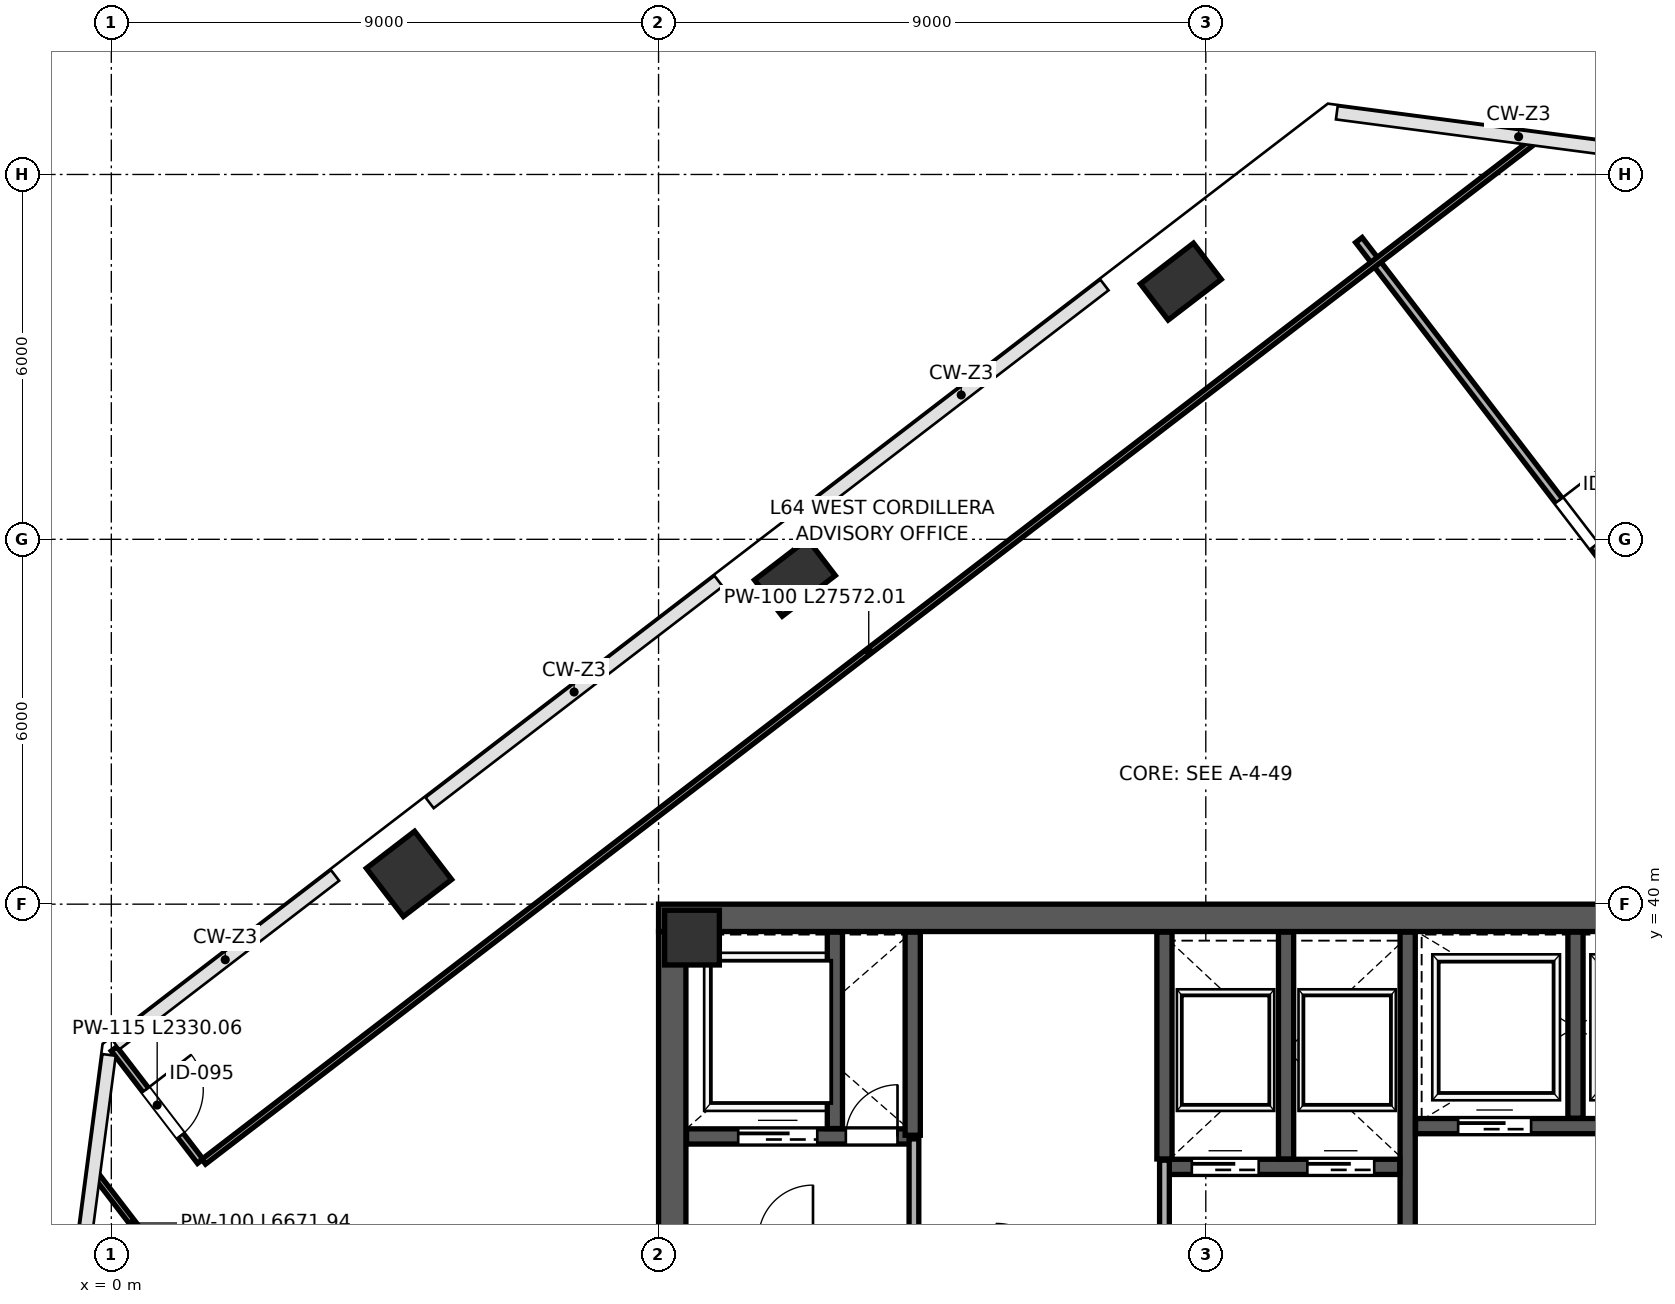
"""IFC4 building model, lengths in metres.
Left out: names, types, materials, properties, quantities, classifications, styles, units other than length and angle.
Written with IfcOpenShell. Run it as: python <this file> out.ifc"""

import sys

from ifc_helpers import new_model, si_unit, direction, frame, frame_2d, origin, origin_2d, place, context, subcontext, project, spatial, rectangle, extrude, source, transform, mapped, element, fill, save


model = new_model("IFC4")
c1 = context("Model", 3, precision=1e-05, world=origin(), true_north=direction((0.0, 1.0)))
c2 = subcontext(c1, "Body", "Model", "MODEL_VIEW")
j1 = project(units=[si_unit("LENGTHUNIT", "METRE"), si_unit("PLANEANGLEUNIT", "RADIAN")], contexts=[c1])
p1 = place(None, origin())
s1 = spatial("IfcSite", under=j1, at=p1, CompositionType="ELEMENT")
p2 = place(p1, origin())
s2 = spatial("IfcBuilding", under=s1, at=p2, CompositionType="ELEMENT")
p3 = place(p2, frame((0.0, 0.0, 283.6)))
s3 = spatial("IfcBuildingStorey", under=s2, at=p3, CompositionType="ELEMENT", Elevation=283.6)
m1 = source(origin(), c2, "Body", "SweptSolid", [
    extrude(rectangle(XDim=0.9, YDim=0.9, at=origin_2d()), origin(), (0.0, 0.0, 1.0), 4.198),
])
p4 = place(p3, frame((9.55, 39.45, 0.001), z_axis=(0.0, 0.0, 1.0), x_axis=(1.0, 0.0, 0.0)))
e1 = element("IfcColumn", 1, at=p4, inside=s3, PredefinedType="COLUMN", context=c2, shape_type="MappedRepresentation", body=[
    mapped(m1, transform((0.0, 0.0, 0.0), scale=1.0)),
])
m2 = source(origin(), c2, "Body", "SweptSolid", [
    extrude(rectangle(XDim=1.0, YDim=1.0, at=origin_2d()), origin(), (0.0, 0.0, 1.0), 4.198),
])
p5 = place(p3, frame((4.896, 40.498, 0.001), z_axis=(0.0, 0.0, 1.0), x_axis=(-0.608761429009, 0.793353340291, 0.0)))
e2 = element("IfcColumn", 2, at=p5, inside=s3, PredefinedType="COLUMN", context=c2, shape_type="MappedRepresentation", body=[
    mapped(m2, transform((0.0, 0.0, 0.0), scale=1.0)),
])
m3 = source(origin(), c2, "Body", "SweptSolid", [
    extrude(rectangle(XDim=0.75, YDim=1.1, at=origin_2d()), origin(), (0.0, 0.0, 1.0), 4.198),
])
for number, where, z_axis, x_axis in (
    (3, (11.242, 45.368, 0.001), (0.0, 0.0, 1.0), (-0.609, 0.793, 0.0)),
    (4, (17.589, 50.238, 0.001), (0.0, 0.0, 1.0), (-0.609, 0.793, 0.0)),
):
    element("IfcColumn", number, at=place(p3, frame(where, z_axis=z_axis, x_axis=x_axis)), inside=s3, PredefinedType="PILASTER", context=c2, shape_type="MappedRepresentation", body=[
        mapped(m3, transform((0.0, 0.0, 0.0), scale=1.0)),
    ])
p6 = place(p3, frame((9.225, 24.45, 0.0), z_axis=(0.0, 0.0, 1.0), x_axis=(0.0, 1.0, 0.0)))
e5 = element("IfcWall", 5, at=p6, inside=s3, PredefinedType="SHEAR", context=c2, shape_type="SweptSolid", body=[
    extrude(rectangle(XDim=15.1, YDim=0.45, at=frame_2d((7.55, 0.0))), origin(), (0.0, 0.0, 1.0), 3.92),
])
p7 = place(p6, frame((8.7, 0.0, 0.0)))
e6 = element("IfcOpeningElement", 6, at=p7, cuts=e5, PredefinedType="OPENING", context=c2, shape_type="SweptSolid", body=[
    extrude(rectangle(XDim=1.15, YDim=2.2, at=frame_2d((0.575, 1.1))), frame((0.0, 0.235, 0.0), z_axis=(0.0, -1.0, 0.0), x_axis=(1.0, 0.0, 0.0)), (0.0, 0.0, 1.0), 0.47),
])
p8 = place(p3, frame((9.0, 39.775, 0.0), z_axis=(0.0, 0.0, 1.0), x_axis=(1.0, 0.0, 0.0)))
e7 = element("IfcWall", 7, at=p8, inside=s3, PredefinedType="SHEAR", context=c2, shape_type="SweptSolid", body=[
    extrude(rectangle(XDim=18.0, YDim=0.45, at=frame_2d((9.0, 0.0))), origin(), (0.0, 0.0, 1.0), 3.92),
])
p9 = place(p3, frame((21.32, 32.12, 0.0), z_axis=(0.0, 0.0, 1.0), x_axis=(0.0, 1.0, 0.0)))
e8 = element("IfcWall", 8, at=p9, inside=s3, PredefinedType="SHEAR", context=c2, shape_type="SweptSolid", body=[
    extrude(rectangle(XDim=7.42, YDim=0.25, at=frame_2d((3.71, 0.0))), origin(), (0.0, 0.0, 1.0), 3.92),
])
p10 = place(p9, frame((1.4, 0.0, 0.0)))
e9 = element("IfcOpeningElement", 9, at=p10, cuts=e8, PredefinedType="OPENING", context=c2, shape_type="SweptSolid", body=[
    extrude(rectangle(XDim=1.15, YDim=2.2, at=frame_2d((0.575, 1.1))), frame((0.0, 0.135, 0.0), z_axis=(0.0, -1.0, 0.0), x_axis=(1.0, 0.0, 0.0)), (0.0, 0.0, 1.0), 0.27),
])
p11 = place(p3, frame((9.46, 36.18, 0.0), z_axis=(0.0, 0.0, 1.0), x_axis=(1.0, 0.0, 0.0)))
e10 = element("IfcWall", 10, at=p11, inside=s3, PredefinedType="SHEAR", context=c2, shape_type="SweptSolid", body=[
    extrude(rectangle(XDim=3.79, YDim=0.25, at=frame_2d((1.895, 0.0))), origin(), (0.0, 0.0, 1.0), 3.92),
])
p12 = place(p11, frame((2.62, 0.0, 0.0)))
e11 = element("IfcOpeningElement", 11, at=p12, cuts=e10, PredefinedType="OPENING", context=c2, shape_type="SweptSolid", body=[
    extrude(rectangle(XDim=0.85, YDim=2.1, at=frame_2d((0.425, 1.05))), frame((0.0, 0.135, 0.0), z_axis=(0.0, -1.0, 0.0), x_axis=(1.0, 0.0, 0.0)), (0.0, 0.0, 1.0), 0.27),
])
p13 = place(p11, frame((0.85, 0.0, 0.0)))
e12 = element("IfcOpeningElement", 12, at=p13, cuts=e10, PredefinedType="OPENING", context=c2, shape_type="SweptSolid", body=[
    extrude(rectangle(XDim=1.3, YDim=2.25, at=frame_2d((0.65, 1.125))), frame((0.0, 0.135, 0.0), z_axis=(0.0, -1.0, 0.0), x_axis=(1.0, 0.0, 0.0)), (0.0, 0.0, 1.0), 0.27),
])
p14 = place(p3, frame((11.9, 36.31, 0.0), z_axis=(0.0, 0.0, 1.0), x_axis=(0.0, 1.0, 0.0)))
e13 = element("IfcWall", 13, at=p14, inside=s3, PredefinedType="SHEAR", context=c2, shape_type="SweptSolid", body=[
    extrude(rectangle(XDim=3.23, YDim=0.25, at=frame_2d((1.615, 0.0))), origin(), (0.0, 0.0, 1.0), 3.92),
])
p15 = place(p3, frame((21.45, 36.35, 0.0), z_axis=(0.0, 0.0, 1.0), x_axis=(1.0, 0.0, 0.0)))
e14 = element("IfcWall", 14, at=p15, inside=s3, PredefinedType="SHEAR", context=c2, shape_type="SweptSolid", body=[
    extrude(rectangle(XDim=5.09, YDim=0.25, at=frame_2d((2.545, 0.0))), origin(), (0.0, 0.0, 1.0), 3.92),
])
p16 = place(p15, frame((0.7, 0.0, 0.0)))
e15 = element("IfcOpeningElement", 15, at=p16, cuts=e14, PredefinedType="OPENING", context=c2, shape_type="SweptSolid", body=[
    extrude(rectangle(XDim=1.2, YDim=2.2, at=frame_2d((0.6, 1.1))), frame((0.0, 0.135, 0.0), z_axis=(0.0, -1.0, 0.0), x_axis=(1.0, 0.0, 0.0)), (0.0, 0.0, 1.0), 0.27),
])
p17 = place(p15, frame((3.25, 0.0, 0.0)))
e16 = element("IfcOpeningElement", 16, at=p17, cuts=e14, PredefinedType="OPENING", context=c2, shape_type="SweptSolid", body=[
    extrude(rectangle(XDim=1.2, YDim=2.2, at=frame_2d((0.6, 1.1))), frame((0.0, 0.135, 0.0), z_axis=(0.0, -1.0, 0.0), x_axis=(1.0, 0.0, 0.0)), (0.0, 0.0, 1.0), 0.27),
])
p18 = place(p3, frame((24.08, 36.48, 0.0), z_axis=(0.0, 0.0, 1.0), x_axis=(0.0, 1.0, 0.0)))
e17 = element("IfcWall", 17, at=p18, inside=s3, PredefinedType="SHEAR", context=c2, shape_type="SweptSolid", body=[
    extrude(rectangle(XDim=3.06, YDim=0.25, at=frame_2d((1.53, 0.0))), origin(), (0.0, 0.0, 1.0), 3.92),
])
p19 = place(p3, frame((13.18, 36.2, 0.0), z_axis=(0.0, 0.0, 1.0), x_axis=(0.0, 1.0, 0.0)))
e18 = element("IfcWall", 18, at=p19, inside=s3, PredefinedType="SHEAR", context=c2, shape_type="SweptSolid", body=[
    extrude(rectangle(XDim=3.34, YDim=0.25, at=frame_2d((1.67, 0.0))), origin(), (0.0, 0.0, 1.0), 3.92),
])
p20 = place(p3, frame((17.32, 35.68, 0.0), z_axis=(0.0, 0.0, 1.0), x_axis=(1.0, 0.0, 0.0)))
e19 = element("IfcWall", 19, at=p20, inside=s3, PredefinedType="SHEAR", context=c2, shape_type="SweptSolid", body=[
    extrude(rectangle(XDim=3.87, YDim=0.25, at=frame_2d((1.935, 0.0))), origin(), (0.0, 0.0, 1.0), 3.92),
])
p21 = place(p20, frame((0.45, 0.0, 0.0)))
e20 = element("IfcOpeningElement", 20, at=p21, cuts=e19, PredefinedType="OPENING", context=c2, shape_type="SweptSolid", body=[
    extrude(rectangle(XDim=1.1, YDim=2.2, at=frame_2d((0.55, 1.1))), frame((0.0, 0.135, 0.0), z_axis=(0.0, -1.0, 0.0), x_axis=(1.0, 0.0, 0.0)), (0.0, 0.0, 1.0), 0.27),
])
p22 = place(p20, frame((2.35, 0.0, 0.0)))
e21 = element("IfcOpeningElement", 21, at=p22, cuts=e19, PredefinedType="OPENING", context=c2, shape_type="SweptSolid", body=[
    extrude(rectangle(XDim=1.1, YDim=2.2, at=frame_2d((0.55, 1.1))), frame((0.0, 0.135, 0.0), z_axis=(0.0, -1.0, 0.0), x_axis=(1.0, 0.0, 0.0)), (0.0, 0.0, 1.0), 0.27),
])
for number, where, z_axis, x_axis in (
    (22, (17.32, 35.81, 0.0), (0.0, 0.0, 1.0), (0.0, 1.0, 0.0)),
    (23, (19.32, 35.81, 0.0), (0.0, 0.0, 1.0), (0.0, 1.0, 0.0)),
):
    element("IfcWall", number, at=place(p3, frame(where, z_axis=z_axis, x_axis=x_axis)), inside=s3, PredefinedType="SHEAR", context=c2, shape_type="SweptSolid", body=[
        extrude(rectangle(XDim=3.73, YDim=0.25, at=frame_2d((1.865, 0.0))), origin(), (0.0, 0.0, 1.0), 3.92),
    ])
p23 = place(p3, frame((13.2, 34.57, 0.0), z_axis=(0.0, 0.0, 1.0), x_axis=(0.0, 1.0, 0.0)))
e24 = element("IfcWall", 24, at=p23, inside=s3, PredefinedType="PARTITIONING", context=c2, shape_type="SweptSolid", body=[
    extrude(rectangle(XDim=1.57, YDim=0.16, at=frame_2d((0.785, 0.0))), origin(), (0.0, 0.0, 1.0), 3.92),
])
p24 = place(p3, frame((17.32, 33.86, 0.0), z_axis=(0.0, 0.0, 1.0), x_axis=(0.0, 1.0, 0.0)))
e25 = element("IfcWall", 25, at=p24, inside=s3, PredefinedType="PARTITIONING", context=c2, shape_type="SweptSolid", body=[
    extrude(rectangle(XDim=1.93, YDim=0.16, at=frame_2d((0.965, 0.0))), origin(), (0.0, 0.0, 1.0), 3.92),
])
p25 = place(p3, frame((-0.258, 35.551, 0.0), z_axis=(0.0, 0.0, 1.0), x_axis=(0.608751837986, -0.79336069965, 0.0)))
e26 = element("IfcWall", 26, at=p25, inside=s3, PredefinedType="PARTITIONING", context=c2, shape_type="SweptSolid", body=[
    extrude(rectangle(XDim=6.672, YDim=0.1, at=frame_2d((3.336, 0.0))), origin(), (0.0, 0.0, 1.0), 3.92),
])
p26 = place(p25, frame((2.15, 0.0, 0.0)))
e27 = element("IfcOpeningElement", 27, at=p26, cuts=e26, PredefinedType="OPENING", context=c2, shape_type="SweptSolid", body=[
    extrude(rectangle(XDim=0.9, YDim=2.15, at=frame_2d((0.45, 1.075))), frame((0.0, 0.06, 0.0), z_axis=(0.0, -1.0, 0.0), x_axis=(1.0, 0.0, 0.0)), (0.0, 0.0, 1.0), 0.12),
])
p27 = place(p25, frame((4.25, 0.0, 0.0)))
e28 = element("IfcOpeningElement", 28, at=p27, cuts=e26, PredefinedType="OPENING", context=c2, shape_type="SweptSolid", body=[
    extrude(rectangle(XDim=0.95, YDim=2.15, at=frame_2d((0.475, 1.075))), frame((0.0, 0.06, 0.0), z_axis=(0.0, -1.0, 0.0), x_axis=(1.0, 0.0, 0.0)), (0.0, 0.0, 1.0), 0.12),
])
p28 = place(p3, frame((20.518, 50.922, 0.0), z_axis=(0.0, 0.0, 1.0), x_axis=(0.608759693778, -0.793354671778, 0.0)))
e29 = element("IfcWall", 29, at=p28, inside=s3, PredefinedType="PARTITIONING", context=c2, shape_type="SweptSolid", body=[
    extrude(rectangle(XDim=26.97, YDim=0.135, at=frame_2d((13.485, 0.0))), origin(), (0.0, 0.0, 1.0), 3.92),
])
p29 = place(p28, frame((5.4, 0.0, 0.0)))
e30 = element("IfcOpeningElement", 30, at=p29, cuts=e29, PredefinedType="OPENING", context=c2, shape_type="SweptSolid", body=[
    extrude(rectangle(XDim=0.95, YDim=2.15, at=frame_2d((0.475, 1.075))), frame((0.0, 0.078, 0.0), z_axis=(0.0, -1.0, 0.0), x_axis=(1.0, 0.0, 0.0)), (0.0, 0.0, 1.0), 0.155),
])
p30 = place(p3, frame((0.045, 37.62, 0.0), z_axis=(0.0, 0.0, 1.0), x_axis=(0.60874824263, -0.793363458381, 0.0)))
e31 = element("IfcWall", 31, at=p30, inside=s3, PredefinedType="PARTITIONING", context=c2, shape_type="SweptSolid", body=[
    extrude(rectangle(XDim=2.33, YDim=0.115, at=frame_2d((1.165, 0.0))), origin(), (0.0, 0.0, 1.0), 3.92),
])
p31 = place(p30, frame((0.85, 0.0, 0.0)))
e32 = element("IfcOpeningElement", 32, at=p31, cuts=e31, PredefinedType="OPENING", context=c2, shape_type="SweptSolid", body=[
    extrude(rectangle(XDim=0.95, YDim=2.15, at=frame_2d((0.475, 1.075))), frame((0.0, 0.067, 0.0), z_axis=(0.0, -1.0, 0.0), x_axis=(1.0, 0.0, 0.0)), (0.0, 0.0, 1.0), 0.135),
])
p32 = place(p3, frame((1.519, 35.764, 0.0), z_axis=(0.0, 0.0, 1.0), x_axis=(0.793353184068, 0.608761632602, 0.0)))
e33 = element("IfcWall", 33, at=p32, inside=s3, PredefinedType="PARTITIONING", context=c2, shape_type="SweptSolid", body=[
    extrude(rectangle(XDim=27.572, YDim=0.1, at=frame_2d((13.786, 0.0))), origin(), (0.0, 0.0, 1.0), 3.92),
])
m4 = source(origin(), c2, "Body", "SweptSolid", [
    extrude(rectangle(XDim=0.85, YDim=2.1, at=frame_2d((0.425, 1.05))), frame((0.0, 0.025, 0.0), z_axis=(0.0, -1.0, 0.0), x_axis=(1.0, 0.0, 0.0)), (0.0, 0.0, 1.0), 0.05),
])
p33 = place(p12, origin())
e34 = element("IfcDoor", 34, at=p33, inside=s3, OperationType="SINGLE_SWING_RIGHT", PredefinedType="DOOR", context=c2, shape_type="MappedRepresentation", body=[
    mapped(m4, transform((0.0, 0.0, 0.0), scale=1.0)),
])
fill(e11, e34)
m5 = source(origin(), c2, "Body", "SweptSolid", [
    extrude(rectangle(XDim=1.1, YDim=2.2, at=frame_2d((0.55, 1.1))), frame((0.0, 0.025, 0.0), z_axis=(0.0, -1.0, 0.0), x_axis=(1.0, 0.0, 0.0)), (0.0, 0.0, 1.0), 0.05),
])
p34 = place(p21, origin())
e35 = element("IfcDoor", 35, at=p34, inside=s3, OperationType="SLIDING_TO_LEFT", PredefinedType="DOOR", context=c2, shape_type="MappedRepresentation", body=[
    mapped(m5, transform((0.0, 0.0, 0.0), scale=1.0)),
])
fill(e20, e35)
p35 = place(p22, origin())
e36 = element("IfcDoor", 36, at=p35, inside=s3, OperationType="SLIDING_TO_RIGHT", PredefinedType="DOOR", context=c2, shape_type="MappedRepresentation", body=[
    mapped(m5, transform((0.0, 0.0, 0.0), scale=1.0)),
])
fill(e21, e36)
m6 = source(origin(), c2, "Body", "SweptSolid", [
    extrude(rectangle(XDim=1.2, YDim=2.2, at=frame_2d((0.6, 1.1))), frame((0.0, 0.025, 0.0), z_axis=(0.0, -1.0, 0.0), x_axis=(1.0, 0.0, 0.0)), (0.0, 0.0, 1.0), 0.05),
])
p36 = place(p16, origin())
e37 = element("IfcDoor", 37, at=p36, inside=s3, OperationType="SLIDING_TO_LEFT", PredefinedType="DOOR", context=c2, shape_type="MappedRepresentation", body=[
    mapped(m6, transform((0.0, 0.0, 0.0), scale=1.0)),
])
fill(e15, e37)
m7 = source(origin(), c2, "Body", "SweptSolid", [
    extrude(rectangle(XDim=1.3, YDim=2.25, at=frame_2d((0.65, 1.125))), frame((0.0, 0.025, 0.0), z_axis=(0.0, -1.0, 0.0), x_axis=(1.0, 0.0, 0.0)), (0.0, 0.0, 1.0), 0.05),
])
p37 = place(p13, origin())
e38 = element("IfcDoor", 38, at=p37, inside=s3, OperationType="SLIDING_TO_LEFT", PredefinedType="DOOR", context=c2, shape_type="MappedRepresentation", body=[
    mapped(m7, transform((0.0, 0.0, 0.0), scale=1.0)),
])
fill(e12, e38)
m8 = source(origin(), c2, "Body", "SweptSolid", [
    extrude(rectangle(XDim=0.95, YDim=2.15, at=frame_2d((0.475, 1.075))), frame((0.0, 0.025, 0.0), z_axis=(0.0, -1.0, 0.0), x_axis=(1.0, 0.0, 0.0)), (0.0, 0.0, 1.0), 0.05),
])
p38 = place(p29, origin())
e39 = element("IfcDoor", 39, at=p38, inside=s3, OperationType="SINGLE_SWING_LEFT", PredefinedType="DOOR", context=c2, shape_type="MappedRepresentation", body=[
    mapped(m8, transform((0.0, 0.0, 0.0), scale=1.0)),
])
fill(e30, e39)
p39 = place(p31, origin())
e40 = element("IfcDoor", 40, at=p39, inside=s3, OperationType="SINGLE_SWING_LEFT", PredefinedType="DOOR", context=c2, shape_type="MappedRepresentation", body=[
    mapped(m8, transform((0.0, 0.0, 0.0), scale=1.0)),
])
fill(e32, e40)
save(model, sys.argv[1])
